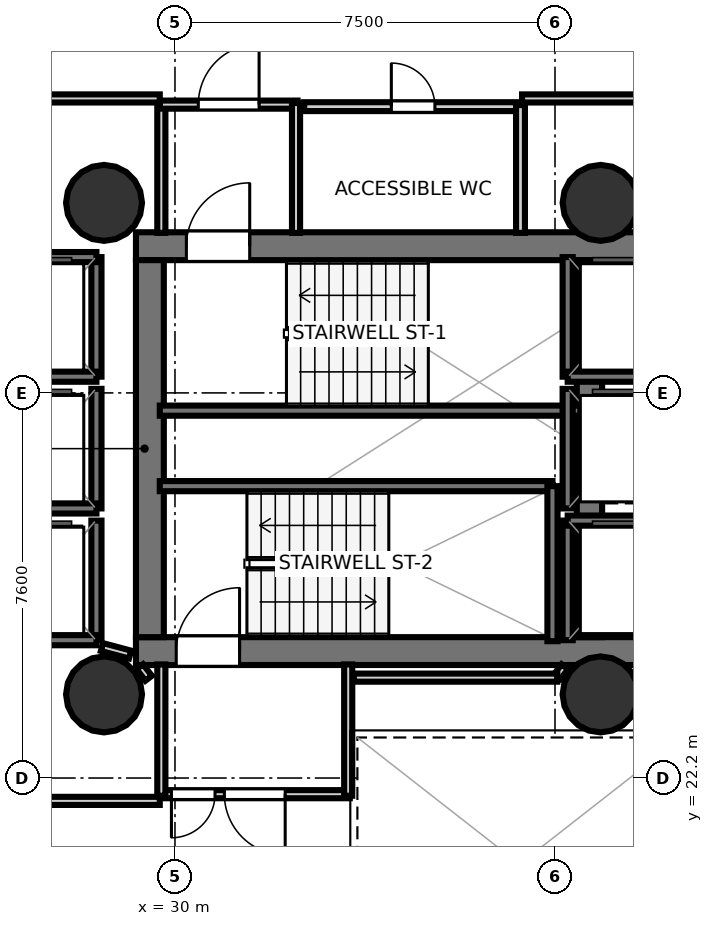
"""IFC4 building model, lengths in metres.
Left out: names, types, materials, properties, quantities, classifications, styles, units other than length and angle.
Written with IfcOpenShell. Run it as: python <this file> out.ifc"""

import sys

from ifc_helpers import new_model, si_unit, direction, frame, frame_2d, origin, origin_2d, place, context, subcontext, project, spatial, rectangle, hollow_circle, extrude, element, fill, save


model = new_model("IFC4")
c1 = context("Model", 3, precision=1e-05, world=origin(), true_north=direction((0.0, 1.0)))
c2 = subcontext(c1, "Body", "Model", "MODEL_VIEW")
j1 = project(units=[si_unit("LENGTHUNIT", "METRE"), si_unit("PLANEANGLEUNIT", "RADIAN")], contexts=[c1])
p1 = place(None, origin())
s1 = spatial("IfcSite", under=j1, at=p1, CompositionType="ELEMENT")
p2 = place(p1, origin())
s2 = spatial("IfcBuilding", under=s1, at=p2, CompositionType="ELEMENT")
p3 = place(p2, frame((0.0, 0.0, 120.0)))
s3 = spatial("IfcBuildingStorey", under=s2, at=p3, CompositionType="ELEMENT", Elevation=120.0)
p4 = place(p3, frame((29.23, 32.695, 0.0), z_axis=(0.0, 0.0, 1.0), x_axis=(1.0, 0.0, 0.0)))
e1 = element("IfcWall", 1, at=p4, inside=s3, PredefinedType="SHEAR", context=c2, shape_type="SweptSolid", body=[
    extrude(rectangle(XDim=10.62, YDim=0.55, at=frame_2d((5.31, 0.0))), origin(), (0.0, 0.0, 1.0), 3.52),
])
p5 = place(p4, frame((0.995, 0.0, 0.0)))
e2 = element("IfcOpeningElement", 2, at=p5, cuts=e1, PredefinedType="OPENING", context=c2, shape_type="SweptSolid", body=[
    extrude(rectangle(XDim=1.25, YDim=2.15, at=frame_2d((0.625, 1.075))), frame((0.0, 0.285, 0.0), z_axis=(0.0, -1.0, 0.0), x_axis=(1.0, 0.0, 0.0)), (0.0, 0.0, 1.0), 0.57),
])
p6 = place(p3, frame((29.23, 24.705, 0.0), z_axis=(0.0, 0.0, 1.0), x_axis=(1.0, 0.0, 0.0)))
e3 = element("IfcWall", 3, at=p6, inside=s3, PredefinedType="SHEAR", context=c2, shape_type="SweptSolid", body=[
    extrude(rectangle(XDim=10.62, YDim=0.55, at=frame_2d((5.31, 0.0))), origin(), (0.0, 0.0, 1.0), 3.52),
])
p7 = place(p6, frame((0.795, 0.0, 0.0)))
e4 = element("IfcOpeningElement", 4, at=p7, cuts=e3, PredefinedType="OPENING", context=c2, shape_type="SweptSolid", body=[
    extrude(rectangle(XDim=1.25, YDim=2.15, at=frame_2d((0.625, 1.075))), frame((0.0, 0.285, 0.0), z_axis=(0.0, -1.0, 0.0), x_axis=(1.0, 0.0, 0.0)), (0.0, 0.0, 1.0), 0.57),
])
p8 = place(p3, frame((29.505, 24.98, 0.0), z_axis=(0.0, 0.0, 1.0), x_axis=(0.0, 1.0, 0.0)))
e5 = element("IfcWall", 5, at=p8, inside=s3, PredefinedType="SHEAR", context=c2, shape_type="SweptSolid", body=[
    extrude(rectangle(XDim=7.44, YDim=0.55, at=frame_2d((3.72, 0.0))), origin(), (0.0, 0.0, 1.0), 3.52),
])
p9 = place(p3, frame((38.18, 24.98, 0.0), z_axis=(0.0, 0.0, 1.0), x_axis=(0.0, 1.0, 0.0)))
e6 = element("IfcWall", 6, at=p9, inside=s3, PredefinedType="SHEAR", context=c2, shape_type="SweptSolid", body=[
    extrude(rectangle(XDim=7.44, YDim=0.5, at=frame_2d((3.72, 0.0))), origin(), (0.0, 0.0, 1.0), 3.52),
])
for number, where, z_axis, x_axis in (
    (7, (28.6, 33.55, 0.0), (0.0, 0.0, 1.0), (1.0, 0.0, 0.0)),
    (8, (28.6, 23.85, 0.0), (0.0, 0.0, 1.0), (1.0, 0.0, 0.0)),
    (9, (38.4, 33.55, 0.0), (0.0, 0.0, 1.0), (1.0, 0.0, 0.0)),
    (10, (38.4, 23.85, 0.0), (0.0, 0.0, 1.0), (1.0, 0.0, 0.0)),
):
    element("IfcColumn", number, at=place(p3, frame(where, z_axis=z_axis, x_axis=x_axis)), inside=s3, PredefinedType="COLUMN", context=c2, shape_type="SweptSolid", body=[
        extrude(hollow_circle(Radius=0.75, WallThickness=0.036, at=origin_2d()), origin(), (0.0, 0.0, 1.0), 3.7),
    ])
p10 = place(p3, frame((29.7, 29.45, 0.0), z_axis=(0.0, 0.0, 1.0), x_axis=(1.0, 0.0, 0.0)))
e11 = element("IfcWall", 11, at=p10, inside=s3, PredefinedType="SOLIDWALL", context=c2, shape_type="SweptSolid", body=[
    extrude(rectangle(XDim=8.3, YDim=0.2, at=frame_2d((4.15, 0.0))), origin(), (0.0, 0.0, 1.0), 3.52),
])
p11 = place(p3, frame((29.7, 27.96, 0.0), z_axis=(0.0, 0.0, 1.0), x_axis=(1.0, 0.0, 0.0)))
e12 = element("IfcWall", 12, at=p11, inside=s3, PredefinedType="SOLIDWALL", context=c2, shape_type="SweptSolid", body=[
    extrude(rectangle(XDim=7.75, YDim=0.2, at=frame_2d((3.875, 0.0))), origin(), (0.0, 0.0, 1.0), 3.52),
])
p12 = place(p3, frame((37.45, 24.9, 0.0), z_axis=(0.0, 0.0, 1.0), x_axis=(0.0, 1.0, 0.0)))
e13 = element("IfcWall", 13, at=p12, inside=s3, PredefinedType="SOLIDWALL", context=c2, shape_type="SweptSolid", body=[
    extrude(rectangle(XDim=3.06, YDim=0.2, at=frame_2d((1.53, 0.0))), origin(), (0.0, 0.0, 1.0), 3.52),
])
p13 = place(p3, frame((37.75, 30.12, 0.0), z_axis=(0.0, 0.0, 1.0), x_axis=(0.0, 1.0, 0.0)))
e14 = element("IfcWall", 14, at=p13, inside=s3, PredefinedType="SOLIDWALL", context=c2, shape_type="SweptSolid", body=[
    extrude(rectangle(XDim=2.36, YDim=0.2, at=frame_2d((1.18, 0.0))), origin(), (0.0, 0.0, 1.0), 3.52),
])
p14 = place(p3, frame((37.75, 30.12, 0.0), z_axis=(0.0, 0.0, 1.0), x_axis=(1.0, 0.0, 0.0)))
e15 = element("IfcWall", 15, at=p14, inside=s3, PredefinedType="SOLIDWALL", context=c2, shape_type="SweptSolid", body=[
    extrude(rectangle(XDim=2.1, YDim=0.2, at=frame_2d((1.05, 0.0))), origin(), (0.0, 0.0, 1.0), 3.52),
])
p15 = place(p3, frame((37.75, 24.92, 0.0), z_axis=(0.0, 0.0, 1.0), x_axis=(0.0, 1.0, 0.0)))
e16 = element("IfcWall", 16, at=p15, inside=s3, PredefinedType="SOLIDWALL", context=c2, shape_type="SweptSolid", body=[
    extrude(rectangle(XDim=2.36, YDim=0.2, at=frame_2d((1.18, 0.0))), origin(), (0.0, 0.0, 1.0), 3.52),
])
p16 = place(p3, frame((37.75, 27.28, 0.0), z_axis=(0.0, 0.0, 1.0), x_axis=(1.0, 0.0, 0.0)))
e17 = element("IfcWall", 17, at=p16, inside=s3, PredefinedType="SOLIDWALL", context=c2, shape_type="SweptSolid", body=[
    extrude(rectangle(XDim=2.1, YDim=0.2, at=frame_2d((1.05, 0.0))), origin(), (0.0, 0.0, 1.0), 3.52),
])
p17 = place(p3, frame((28.45, 30.12, 0.0), z_axis=(0.0, 0.0, 1.0), x_axis=(0.0, 1.0, 0.0)))
e18 = element("IfcWall", 18, at=p17, inside=s3, PredefinedType="SOLIDWALL", context=c2, shape_type="SweptSolid", body=[
    extrude(rectangle(XDim=2.36, YDim=0.2, at=frame_2d((1.18, 0.0))), origin(), (0.0, 0.0, 1.0), 3.52),
])
for number, where, z_axis, x_axis in (
    (19, (26.35, 32.48, 0.0), (0.0, 0.0, 1.0), (1.0, 0.0, 0.0)),
    (20, (26.35, 30.12, 0.0), (0.0, 0.0, 1.0), (1.0, 0.0, 0.0)),
):
    element("IfcWall", number, at=place(p3, frame(where, z_axis=z_axis, x_axis=x_axis)), inside=s3, PredefinedType="SOLIDWALL", context=c2, shape_type="SweptSolid", body=[
        extrude(rectangle(XDim=2.1, YDim=0.2, at=frame_2d((1.05, 0.0))), origin(), (0.0, 0.0, 1.0), 3.52),
    ])
p18 = place(p3, frame((28.45, 27.52, 0.0), z_axis=(0.0, 0.0, 1.0), x_axis=(0.0, 1.0, 0.0)))
e21 = element("IfcWall", 21, at=p18, inside=s3, PredefinedType="SOLIDWALL", context=c2, shape_type="SweptSolid", body=[
    extrude(rectangle(XDim=2.36, YDim=0.2, at=frame_2d((1.18, 0.0))), origin(), (0.0, 0.0, 1.0), 3.52),
])
p19 = place(p3, frame((26.35, 27.52, 0.0), z_axis=(0.0, 0.0, 1.0), x_axis=(1.0, 0.0, 0.0)))
e22 = element("IfcWall", 22, at=p19, inside=s3, PredefinedType="SOLIDWALL", context=c2, shape_type="SweptSolid", body=[
    extrude(rectangle(XDim=2.1, YDim=0.2, at=frame_2d((1.05, 0.0))), origin(), (0.0, 0.0, 1.0), 3.52),
])
p20 = place(p3, frame((28.45, 24.92, 0.0), z_axis=(0.0, 0.0, 1.0), x_axis=(0.0, 1.0, 0.0)))
e23 = element("IfcWall", 23, at=p20, inside=s3, PredefinedType="SOLIDWALL", context=c2, shape_type="SweptSolid", body=[
    extrude(rectangle(XDim=2.36, YDim=0.2, at=frame_2d((1.18, 0.0))), origin(), (0.0, 0.0, 1.0), 3.52),
])
p21 = place(p3, frame((26.35, 24.92, 0.0), z_axis=(0.0, 0.0, 1.0), x_axis=(1.0, 0.0, 0.0)))
e24 = element("IfcWall", 24, at=p21, inside=s3, PredefinedType="SOLIDWALL", context=c2, shape_type="SweptSolid", body=[
    extrude(rectangle(XDim=2.1, YDim=0.2, at=frame_2d((1.05, 0.0))), origin(), (0.0, 0.0, 1.0), 3.52),
])
p22 = place(p3, frame((37.75, 27.52, 0.0), z_axis=(0.0, 0.0, 1.0), x_axis=(0.0, 1.0, 0.0)))
e25 = element("IfcWall", 25, at=p22, inside=s3, PredefinedType="SOLIDWALL", context=c2, shape_type="SweptSolid", body=[
    extrude(rectangle(XDim=2.36, YDim=0.2, at=frame_2d((1.18, 0.0))), origin(), (0.0, 0.0, 1.0), 3.52),
])
p23 = place(p3, frame((29.731, 32.958, 0.0), z_axis=(0.0, 0.0, 1.0), x_axis=(0.0, 1.0, 0.0)))
e26 = element("IfcWall", 26, at=p23, inside=s3, PredefinedType="PARTITIONING", context=c2, shape_type="SweptSolid", body=[
    extrude(rectangle(XDim=2.562, YDim=0.16, at=frame_2d((1.281, 0.0))), origin(), (0.0, 0.0, 1.0), 2.84),
])
p24 = place(p3, frame((29.7, 35.489, 0.0), z_axis=(0.0, 0.0, 1.0), x_axis=(1.0, 0.0, 0.0)))
e27 = element("IfcWall", 27, at=p24, inside=s3, PredefinedType="PARTITIONING", context=c2, shape_type="SweptSolid", body=[
    extrude(rectangle(XDim=2.72, YDim=0.16, at=frame_2d((1.36, 0.0))), origin(), (0.0, 0.0, 1.0), 2.84),
])
p25 = place(p24, frame((0.76, 0.0, 0.0)))
e28 = element("IfcOpeningElement", 28, at=p25, cuts=e27, PredefinedType="OPENING", context=c2, shape_type="SweptSolid", body=[
    extrude(rectangle(XDim=1.2, YDim=2.15, at=frame_2d((0.6, 1.075))), frame((0.0, 0.09, 0.0), z_axis=(0.0, -1.0, 0.0), x_axis=(1.0, 0.0, 0.0)), (0.0, 0.0, 1.0), 0.18),
])
p26 = place(p3, frame((32.389, 35.52, 0.0), z_axis=(0.0, 0.0, 1.0), x_axis=(0.0, -1.0, 0.0)))
e29 = element("IfcWall", 29, at=p26, inside=s3, PredefinedType="PARTITIONING", context=c2, shape_type="SweptSolid", body=[
    extrude(rectangle(XDim=2.562, YDim=0.16, at=frame_2d((1.281, 0.0))), origin(), (0.0, 0.0, 1.0), 2.84),
])
p27 = place(p3, frame((33.45, 21.881, 0.0), z_axis=(0.0, 0.0, 1.0), x_axis=(-1.0, 0.0, 0.0)))
e30 = element("IfcWall", 30, at=p27, inside=s3, PredefinedType="PARTITIONING", context=c2, shape_type="SweptSolid", body=[
    extrude(rectangle(XDim=3.75, YDim=0.16, at=frame_2d((1.875, 0.0))), origin(), (0.0, 0.0, 1.0), 2.84),
])
p28 = place(p27, frame((1.275, 0.0, 0.0)))
e31 = element("IfcOpeningElement", 31, at=p28, cuts=e30, PredefinedType="OPENING", context=c2, shape_type="SweptSolid", body=[
    extrude(rectangle(XDim=1.2, YDim=2.15, at=frame_2d((0.6, 1.075))), frame((0.0, 0.09, 0.0), z_axis=(0.0, -1.0, 0.0), x_axis=(1.0, 0.0, 0.0)), (0.0, 0.0, 1.0), 0.18),
])
p29 = place(p27, frame((2.66, 0.0, 0.0)))
e32 = element("IfcOpeningElement", 32, at=p29, cuts=e30, PredefinedType="OPENING", context=c2, shape_type="SweptSolid", body=[
    extrude(rectangle(XDim=0.86, YDim=2.05, at=frame_2d((0.43, 1.025))), frame((0.0, 0.09, 0.0), z_axis=(0.0, -1.0, 0.0), x_axis=(1.0, 0.0, 0.0)), (0.0, 0.0, 1.0), 0.18),
])
for number, where, z_axis, x_axis in (
    (33, (29.731, 21.85, 0.0), (0.0, 0.0, 1.0), (0.0, 1.0, 0.0)),
    (34, (33.419, 24.442, 0.0), (0.0, 0.0, 1.0), (0.0, -1.0, 0.0)),
):
    element("IfcWall", number, at=place(p3, frame(where, z_axis=z_axis, x_axis=x_axis)), inside=s3, PredefinedType="PARTITIONING", context=c2, shape_type="SweptSolid", body=[
        extrude(rectangle(XDim=2.592, YDim=0.16, at=frame_2d((1.296, 0.0))), origin(), (0.0, 0.0, 1.0), 2.84),
    ])
p30 = place(p3, frame((32.55, 35.449, 0.0), z_axis=(0.0, 0.0, 1.0), x_axis=(1.0, 0.0, 0.0)))
e35 = element("IfcWall", 35, at=p30, inside=s3, PredefinedType="PLUMBINGWALL", context=c2, shape_type="SweptSolid", body=[
    extrude(rectangle(XDim=4.3, YDim=0.175, at=frame_2d((2.15, 0.0))), origin(), (0.0, 0.0, 1.0), 2.84),
])
p31 = place(p30, frame((1.72, 0.0, 0.0)))
e36 = element("IfcOpeningElement", 36, at=p31, cuts=e35, PredefinedType="OPENING", context=c2, shape_type="SweptSolid", body=[
    extrude(rectangle(XDim=0.86, YDim=2.05, at=frame_2d((0.43, 1.025))), frame((0.0, 0.097, 0.0), z_axis=(0.0, -1.0, 0.0), x_axis=(1.0, 0.0, 0.0)), (0.0, 0.0, 1.0), 0.195),
])
p32 = place(p3, frame((36.819, 35.48, 0.0), z_axis=(0.0, 0.0, 1.0), x_axis=(0.0, -1.0, 0.0)))
e37 = element("IfcWall", 37, at=p32, inside=s3, PredefinedType="PLUMBINGWALL", context=c2, shape_type="SweptSolid", body=[
    extrude(rectangle(XDim=2.522, YDim=0.175, at=frame_2d((1.261, 0.0))), origin(), (0.0, 0.0, 1.0), 2.84),
])
p33 = place(p3, frame((29.48, 24.169, 0.0), z_axis=(0.0, 0.0, 1.0), x_axis=(-0.607608252226, 0.794236873878, 0.0)))
e38 = element("IfcWall", 38, at=p33, inside=s3, PredefinedType="PARTITIONING", context=c2, shape_type="SweptSolid", body=[
    extrude(rectangle(XDim=0.286, YDim=0.16, at=frame_2d((0.143, 0.0))), origin(), (0.0, 0.0, 1.0), 2.84),
])
p34 = place(p3, frame((29.114, 24.637, 0.0), z_axis=(0.0, 0.0, 1.0), x_axis=(-0.966199685486, 0.257794817183, 0.0)))
e39 = element("IfcWall", 39, at=p34, inside=s3, PredefinedType="PARTITIONING", context=c2, shape_type="SweptSolid", body=[
    extrude(rectangle(XDim=0.575, YDim=0.16, at=frame_2d((0.288, 0.0))), origin(), (0.0, 0.0, 1.0), 2.84),
])
p35 = place(p3, frame((37.694, 24.396, 0.0), z_axis=(0.0, 0.0, 1.0), x_axis=(-0.607118658061, -0.794611184815, 0.0)))
e40 = element("IfcWall", 40, at=p35, inside=s3, PredefinedType="PARTITIONING", context=c2, shape_type="SweptSolid", body=[
    extrude(rectangle(XDim=0.246, YDim=0.16, at=frame_2d((0.123, 0.0))), origin(), (0.0, 0.0, 1.0), 2.84),
])
p36 = place(p3, frame((37.545, 24.181, 0.0), z_axis=(0.0, 0.0, 1.0), x_axis=(-1.0, 0.0, 0.0)))
e41 = element("IfcWall", 41, at=p36, inside=s3, PredefinedType="PARTITIONING", context=c2, shape_type="SweptSolid", body=[
    extrude(rectangle(XDim=4.015, YDim=0.16, at=frame_2d((2.007, 0.0))), origin(), (0.0, 0.0, 1.0), 2.84),
])
p37 = place(p3, frame((39.818, 35.611, 0.0), z_axis=(0.0, 0.0, 1.0), x_axis=(-1.0, 0.0, 0.0)))
e42 = element("IfcWall", 42, at=p37, inside=s3, PredefinedType="PARTITIONING", context=c2, shape_type="SweptSolid", body=[
    extrude(rectangle(XDim=2.968, YDim=0.16, at=frame_2d((1.484, 0.0))), origin(), (0.0, 0.0, 1.0), 2.84),
])
for number, where, z_axis, x_axis in (
    (43, (29.7, 35.611, 0.0), (0.0, 0.0, 1.0), (-1.0, 0.0, 0.0)),
    (44, (26.42, 21.749, 0.0), (0.0, 0.0, 1.0), (1.0, 0.0, 0.0)),
):
    element("IfcWall", number, at=place(p3, frame(where, z_axis=z_axis, x_axis=x_axis)), inside=s3, PredefinedType="PARTITIONING", context=c2, shape_type="SweptSolid", body=[
        extrude(rectangle(XDim=3.28, YDim=0.16, at=frame_2d((1.64, 0.0))), origin(), (0.0, 0.0, 1.0), 2.84),
    ])
p38 = place(p5, origin())
e45 = element("IfcDoor", 45, at=p38, inside=s3, OperationType="SINGLE_SWING_RIGHT", PredefinedType="DOOR", context=c2, shape_type="SweptSolid", body=[
    extrude(rectangle(XDim=1.25, YDim=2.15, at=frame_2d((0.625, 1.075))), frame((0.0, 0.025, 0.0), z_axis=(0.0, -1.0, 0.0), x_axis=(1.0, 0.0, 0.0)), (0.0, 0.0, 1.0), 0.05),
])
fill(e2, e45)
p39 = place(p7, origin())
e46 = element("IfcDoor", 46, at=p39, inside=s3, OperationType="SINGLE_SWING_RIGHT", PredefinedType="DOOR", context=c2, shape_type="SweptSolid", body=[
    extrude(rectangle(XDim=1.25, YDim=2.15, at=frame_2d((0.625, 1.075))), frame((0.0, 0.025, 0.0), z_axis=(0.0, -1.0, 0.0), x_axis=(1.0, 0.0, 0.0)), (0.0, 0.0, 1.0), 0.05),
])
fill(e4, e46)
p40 = place(p25, origin())
e47 = element("IfcDoor", 47, at=p40, inside=s3, OperationType="SINGLE_SWING_RIGHT", PredefinedType="DOOR", context=c2, shape_type="SweptSolid", body=[
    extrude(rectangle(XDim=1.2, YDim=2.15, at=frame_2d((0.6, 1.075))), frame((0.0, 0.025, 0.0), z_axis=(0.0, -1.0, 0.0), x_axis=(1.0, 0.0, 0.0)), (0.0, 0.0, 1.0), 0.05),
])
fill(e28, e47)
p41 = place(p28, origin())
e48 = element("IfcDoor", 48, at=p41, inside=s3, OperationType="SINGLE_SWING_LEFT", PredefinedType="DOOR", context=c2, shape_type="SweptSolid", body=[
    extrude(rectangle(XDim=1.2, YDim=2.15, at=frame_2d((0.6, 1.075))), frame((0.0, 0.025, 0.0), z_axis=(0.0, -1.0, 0.0), x_axis=(1.0, 0.0, 0.0)), (0.0, 0.0, 1.0), 0.05),
])
fill(e31, e48)
p42 = place(p31, origin())
e49 = element("IfcDoor", 49, at=p42, inside=s3, OperationType="SINGLE_SWING_LEFT", PredefinedType="DOOR", context=c2, shape_type="SweptSolid", body=[
    extrude(rectangle(XDim=0.86, YDim=2.05, at=frame_2d((0.43, 1.025))), frame((0.0, 0.025, 0.0), z_axis=(0.0, -1.0, 0.0), x_axis=(1.0, 0.0, 0.0)), (0.0, 0.0, 1.0), 0.05),
])
fill(e36, e49)
p43 = place(p29, origin())
e50 = element("IfcDoor", 50, at=p43, inside=s3, OperationType="SINGLE_SWING_RIGHT", PredefinedType="DOOR", context=c2, shape_type="SweptSolid", body=[
    extrude(rectangle(XDim=0.86, YDim=2.05, at=frame_2d((0.43, 1.025))), frame((0.0, 0.025, 0.0), z_axis=(0.0, -1.0, 0.0), x_axis=(1.0, 0.0, 0.0)), (0.0, 0.0, 1.0), 0.05),
])
fill(e32, e50)
save(model, sys.argv[1])
